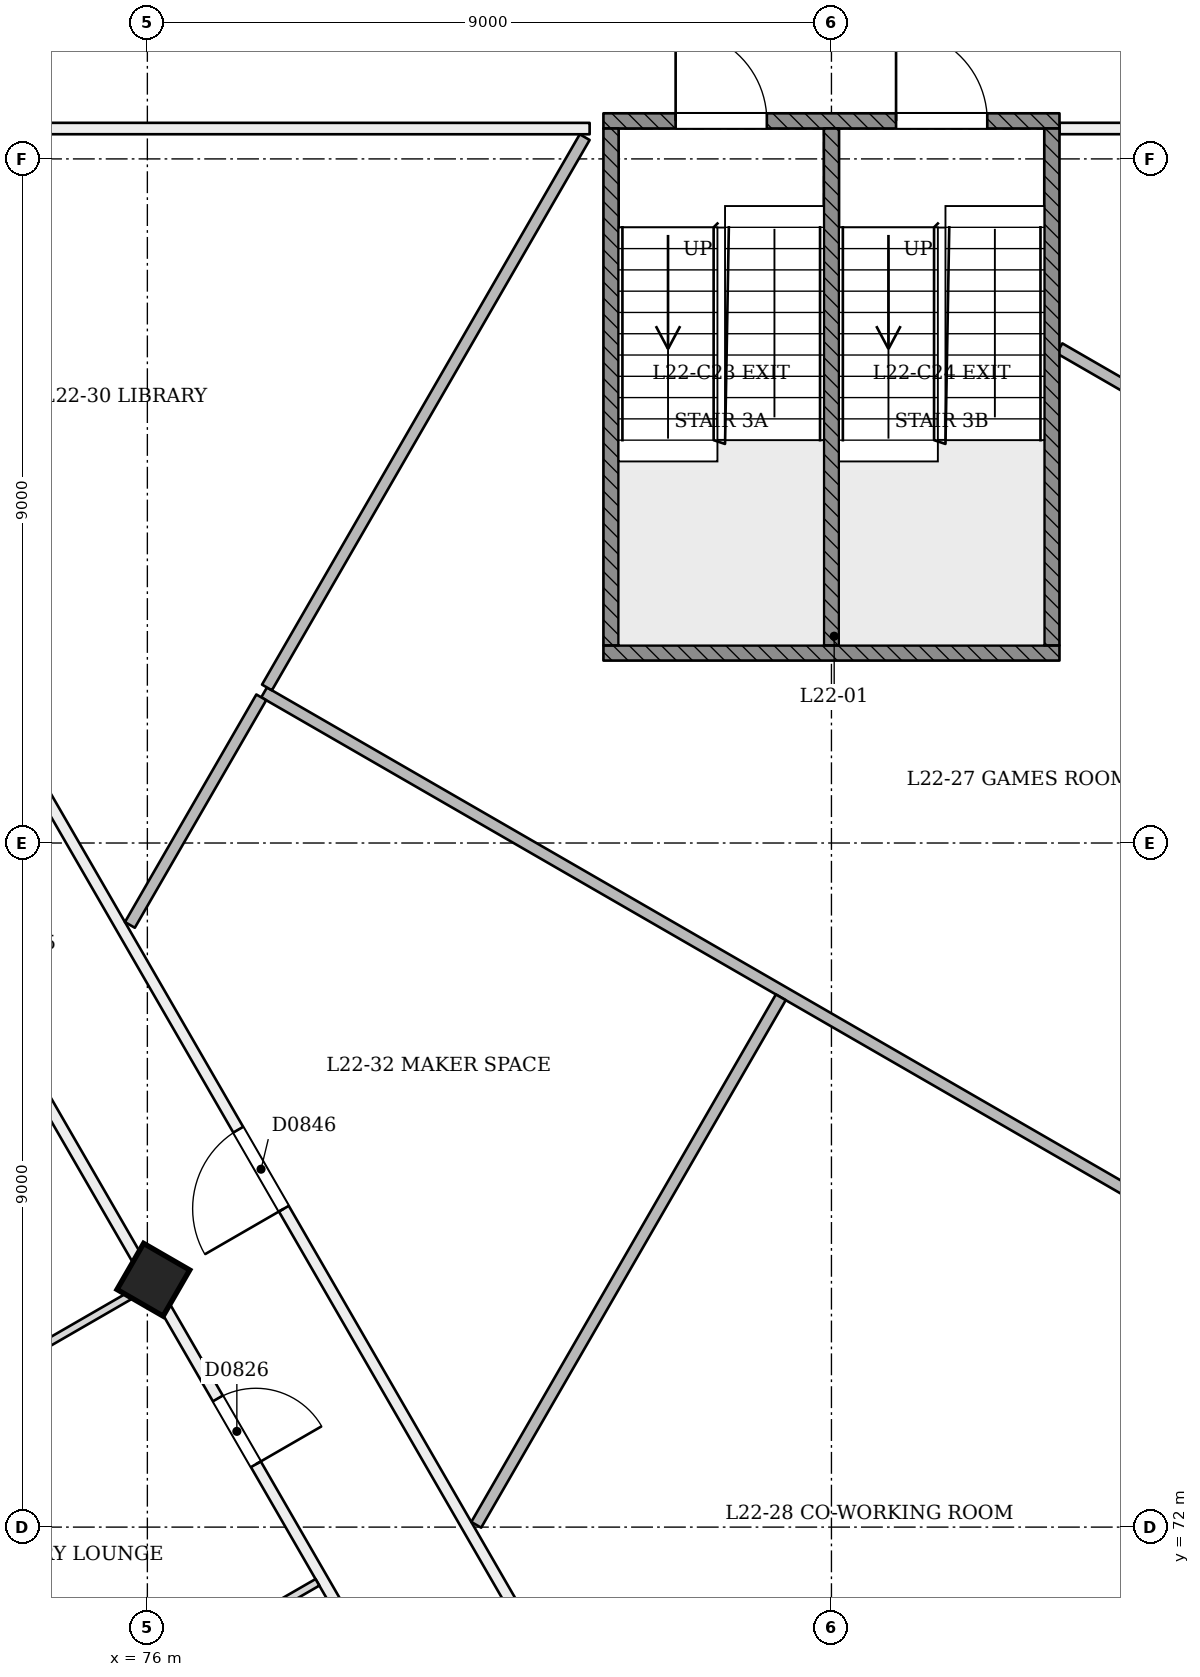
"""IFC4 building model, lengths in metres.
Left out: names, types, materials, properties, quantities, classifications, styles, units other than length and angle.
Written with IfcOpenShell. Run it as: python <this file> out.ifc"""

import sys

from ifc_helpers import new_model, si_unit, direction, frame, frame_2d, origin, origin_2d, place, context, subcontext, project, spatial, rectangle, extrude, element, fill, save


model = new_model("IFC4")
c1 = context("Model", 3, precision=1e-05, world=origin(), true_north=direction((0.0, 1.0)))
c2 = subcontext(c1, "Body", "Model", "MODEL_VIEW")
j1 = project(units=[si_unit("LENGTHUNIT", "METRE"), si_unit("PLANEANGLEUNIT", "RADIAN")], contexts=[c1])
p1 = place(None, origin())
s1 = spatial("IfcSite", under=j1, at=p1, CompositionType="ELEMENT")
p2 = place(p1, origin())
s2 = spatial("IfcBuilding", under=s1, at=p2, CompositionType="ELEMENT")
p3 = place(p2, frame((0.0, 0.0, 88.2)))
s3 = spatial("IfcBuildingStorey", under=s2, at=p3, CompositionType="ELEMENT", Elevation=88.2)
p4 = place(p3, frame((76.052, 75.207, -0.021), z_axis=(0.02222134892, 0.038480872521, 0.999012229206), x_axis=(-0.865642081321, -0.499182199018, 0.038482713395)))
e1 = element("IfcColumn", 1, at=p4, inside=s3, PredefinedType="COLUMN", context=c2, shape_type="SweptSolid", body=[
    extrude(rectangle(XDim=0.7, YDim=0.7, at=origin_2d()), origin(), (0.0, 0.0, 1.0), 3.604),
])
p5 = place(p3, frame((63.198, 97.473, 0.0), z_axis=(0.0, 0.0, 1.0), x_axis=(0.499996804348, -0.866027248787, 0.0)))
e2 = element("IfcWall", 2, at=p5, inside=s3, PredefinedType="PARTITIONING", context=c2, shape_type="SweptSolid", body=[
    extrude(rectangle(XDim=42.418, YDim=0.15, at=frame_2d((21.209, 0.0))), origin(), (0.0, 0.0, 1.0), 2.7),
])
p6 = place(p5, frame((3.123, 0.0, 0.0)))
e3 = element("IfcOpeningElement", 3, at=p6, cuts=e2, PredefinedType="OPENING", context=c2, shape_type="SweptSolid", body=[
    extrude(rectangle(XDim=1.2, YDim=2.1, at=frame_2d((0.6, 1.05))), frame((0.0, 0.085, 0.0), z_axis=(0.0, -1.0, 0.0), x_axis=(1.0, 0.0, 0.0)), (0.0, 0.0, 1.0), 0.171),
])
p7 = place(p5, frame((10.538, 0.0, 0.0)))
e4 = element("IfcOpeningElement", 4, at=p7, cuts=e2, PredefinedType="OPENING", context=c2, shape_type="SweptSolid", body=[
    extrude(rectangle(XDim=1.1, YDim=2.1, at=frame_2d((0.55, 1.05))), frame((0.0, 0.085, 0.0), z_axis=(0.0, -1.0, 0.0), x_axis=(1.0, 0.0, 0.0)), (0.0, 0.0, 1.0), 0.171),
])
p8 = place(p5, frame((12.814, 0.0, 0.0)))
e5 = element("IfcOpeningElement", 5, at=p8, cuts=e2, PredefinedType="OPENING", context=c2, shape_type="SweptSolid", body=[
    extrude(rectangle(XDim=1.0, YDim=2.1, at=frame_2d((0.5, 1.05))), frame((0.0, 0.085, 0.0), z_axis=(0.0, -1.0, 0.0), x_axis=(1.0, 0.0, 0.0)), (0.0, 0.0, 1.0), 0.171),
])
p9 = place(p5, frame((20.609, 0.0, 0.0)))
e6 = element("IfcOpeningElement", 6, at=p9, cuts=e2, PredefinedType="OPENING", context=c2, shape_type="SweptSolid", body=[
    extrude(rectangle(XDim=1.2, YDim=2.1, at=frame_2d((0.6, 1.05))), frame((0.0, 0.085, 0.0), z_axis=(0.0, -1.0, 0.0), x_axis=(1.0, 0.0, 0.0)), (0.0, 0.0, 1.0), 0.171),
])
p10 = place(p5, frame((27.459, 0.0, 0.0)))
e7 = element("IfcOpeningElement", 7, at=p10, cuts=e2, PredefinedType="OPENING", context=c2, shape_type="SweptSolid", body=[
    extrude(rectangle(XDim=1.0, YDim=2.1, at=frame_2d((0.5, 1.05))), frame((0.0, 0.085, 0.0), z_axis=(0.0, -1.0, 0.0), x_axis=(1.0, 0.0, 0.0)), (0.0, 0.0, 1.0), 0.171),
])
p11 = place(p5, frame((31.959, 0.0, 0.0)))
e8 = element("IfcOpeningElement", 8, at=p11, cuts=e2, PredefinedType="OPENING", context=c2, shape_type="SweptSolid", body=[
    extrude(rectangle(XDim=1.0, YDim=2.1, at=frame_2d((0.5, 1.05))), frame((0.0, 0.085, 0.0), z_axis=(0.0, -1.0, 0.0), x_axis=(1.0, 0.0, 0.0)), (0.0, 0.0, 1.0), 0.171),
])
p12 = place(p5, frame((40.905, 0.0, 0.0)))
e9 = element("IfcOpeningElement", 9, at=p12, cuts=e2, PredefinedType="OPENING", context=c2, shape_type="SweptSolid", body=[
    extrude(rectangle(XDim=1.2, YDim=2.1, at=frame_2d((0.6, 1.05))), frame((0.0, 0.085, 0.0), z_axis=(0.0, -1.0, 0.0), x_axis=(1.0, 0.0, 0.0)), (0.0, 0.0, 1.0), 0.171),
])
p13 = place(p3, frame((87.198, 63.517, 0.0), z_axis=(0.0, 0.0, 1.0), x_axis=(0.499999136801, 0.866025902152, 0.0)))
e10 = element("IfcWall", 10, at=p13, inside=s3, PredefinedType="PARTITIONING", context=c2, shape_type="SweptSolid", body=[
    extrude(rectangle(XDim=39.209, YDim=0.15, at=frame_2d((19.604, 0.0))), origin(), (0.0, 0.0, 1.0), 2.7),
])
p14 = place(p13, frame((2.8, 0.0, 0.0)))
e11 = element("IfcOpeningElement", 11, at=p14, cuts=e10, PredefinedType="OPENING", context=c2, shape_type="SweptSolid", body=[
    extrude(rectangle(XDim=1.2, YDim=2.1, at=frame_2d((0.6, 1.05))), frame((0.0, 0.085, 0.0), z_axis=(0.0, -1.0, 0.0), x_axis=(1.0, 0.0, 0.0)), (0.0, 0.0, 1.0), 0.171),
])
p15 = place(p13, frame((9.72, 0.0, 0.0)))
e12 = element("IfcOpeningElement", 12, at=p15, cuts=e10, PredefinedType="OPENING", context=c2, shape_type="SweptSolid", body=[
    extrude(rectangle(XDim=1.0, YDim=2.1, at=frame_2d((0.5, 1.05))), frame((0.0, 0.085, 0.0), z_axis=(0.0, -1.0, 0.0), x_axis=(1.0, 0.0, 0.0)), (0.0, 0.0, 1.0), 0.171),
])
p16 = place(p13, frame((16.395, 0.0, 0.0)))
e13 = element("IfcOpeningElement", 13, at=p16, cuts=e10, PredefinedType="OPENING", context=c2, shape_type="SweptSolid", body=[
    extrude(rectangle(XDim=1.0, YDim=2.1, at=frame_2d((0.5, 1.05))), frame((0.0, 0.085, 0.0), z_axis=(0.0, -1.0, 0.0), x_axis=(1.0, 0.0, 0.0)), (0.0, 0.0, 1.0), 0.171),
])
p17 = place(p13, frame((19.75, 0.0, 0.0)))
e14 = element("IfcOpeningElement", 14, at=p17, cuts=e10, PredefinedType="OPENING", context=c2, shape_type="SweptSolid", body=[
    extrude(rectangle(XDim=1.0, YDim=2.1, at=frame_2d((0.5, 1.05))), frame((0.0, 0.085, 0.0), z_axis=(0.0, -1.0, 0.0), x_axis=(1.0, 0.0, 0.0)), (0.0, 0.0, 1.0), 0.171),
])
p18 = place(p13, frame((25.395, 0.0, 0.0)))
e15 = element("IfcOpeningElement", 15, at=p18, cuts=e10, PredefinedType="OPENING", context=c2, shape_type="SweptSolid", body=[
    extrude(rectangle(XDim=1.0, YDim=2.1, at=frame_2d((0.5, 1.05))), frame((0.0, 0.085, 0.0), z_axis=(0.0, -1.0, 0.0), x_axis=(1.0, 0.0, 0.0)), (0.0, 0.0, 1.0), 0.171),
])
p19 = place(p13, frame((29.8, 0.0, 0.0)))
e16 = element("IfcOpeningElement", 16, at=p19, cuts=e10, PredefinedType="OPENING", context=c2, shape_type="SweptSolid", body=[
    extrude(rectangle(XDim=1.2, YDim=2.1, at=frame_2d((0.6, 1.05))), frame((0.0, 0.085, 0.0), z_axis=(0.0, -1.0, 0.0), x_axis=(1.0, 0.0, 0.0)), (0.0, 0.0, 1.0), 0.171),
])
p20 = place(p13, frame((37.225, 0.0, 0.0)))
e17 = element("IfcOpeningElement", 17, at=p20, cuts=e10, PredefinedType="OPENING", context=c2, shape_type="SweptSolid", body=[
    extrude(rectangle(XDim=1.0, YDim=2.1, at=frame_2d((0.5, 1.05))), frame((0.0, 0.085, 0.0), z_axis=(0.0, -1.0, 0.0), x_axis=(1.0, 0.0, 0.0)), (0.0, 0.0, 1.0), 0.171),
])
p21 = place(p3, frame((100.409, 90.4, 0.0), z_axis=(0.0, 0.0, 1.0), x_axis=(-0.500001354695, -0.86602462165, 0.0)))
e18 = element("IfcWall", 18, at=p21, inside=s3, PredefinedType="PARTITIONING", context=c2, shape_type="SweptSolid", body=[
    extrude(rectangle(XDim=30.688, YDim=0.15, at=frame_2d((15.344, 0.0))), origin(), (0.0, 0.0, 1.0), 3.1),
])
p22 = place(p21, frame((13.301, 0.0, 0.0)))
e19 = element("IfcOpeningElement", 19, at=p22, cuts=e18, PredefinedType="OPENING", context=c2, shape_type="SweptSolid", body=[
    extrude(rectangle(XDim=1.2, YDim=2.1, at=frame_2d((0.6, 1.05))), frame((0.0, 0.085, 0.0), z_axis=(0.0, -1.0, 0.0), x_axis=(1.0, 0.0, 0.0)), (0.0, 0.0, 1.0), 0.171),
])
p23 = place(p21, frame((4.95, 0.0, 0.0)))
e20 = element("IfcOpeningElement", 20, at=p23, cuts=e18, PredefinedType="OPENING", context=c2, shape_type="SweptSolid", body=[
    extrude(rectangle(XDim=1.2, YDim=2.1, at=frame_2d((0.6, 1.05))), frame((0.0, 0.085, 0.0), z_axis=(0.0, -1.0, 0.0), x_axis=(1.0, 0.0, 0.0)), (0.0, 0.0, 1.0), 0.171),
])
p24 = place(p3, frame((85.0, 63.711, 0.0), z_axis=(0.0, 0.0, 1.0), x_axis=(-0.500003837735, 0.866023188056, 0.0)))
e21 = element("IfcWall", 21, at=p24, inside=s3, PredefinedType="PARTITIONING", context=c2, shape_type="SweptSolid", body=[
    extrude(rectangle(XDim=30.818, YDim=0.15, at=frame_2d((15.409, 0.0))), origin(), (0.0, 0.0, 1.0), 3.1),
])
p25 = place(p24, frame((6.476, 0.0, 0.0)))
e22 = element("IfcOpeningElement", 22, at=p25, cuts=e21, PredefinedType="OPENING", context=c2, shape_type="SweptSolid", body=[
    extrude(rectangle(XDim=1.2, YDim=2.1, at=frame_2d((0.6, 1.05))), frame((0.0, 0.085, 0.0), z_axis=(0.0, -1.0, 0.0), x_axis=(1.0, 0.0, 0.0)), (0.0, 0.0, 1.0), 0.171),
])
p26 = place(p24, frame((24.104, 0.0, 0.0)))
e23 = element("IfcOpeningElement", 23, at=p26, cuts=e21, PredefinedType="OPENING", context=c2, shape_type="SweptSolid", body=[
    extrude(rectangle(XDim=1.2, YDim=2.1, at=frame_2d((0.6, 1.05))), frame((0.0, 0.085, 0.0), z_axis=(0.0, -1.0, 0.0), x_axis=(1.0, 0.0, 0.0)), (0.0, 0.0, 1.0), 0.171),
])
p27 = place(p24, frame((14.409, 0.0, 0.0)))
e24 = element("IfcOpeningElement", 24, at=p27, cuts=e21, PredefinedType="OPENING", context=c2, shape_type="SweptSolid", body=[
    extrude(rectangle(XDim=1.2, YDim=2.1, at=frame_2d((0.6, 1.05))), frame((0.0, 0.085, 0.0), z_axis=(0.0, -1.0, 0.0), x_axis=(1.0, 0.0, 0.0)), (0.0, 0.0, 1.0), 0.171),
])
p28 = place(p3, frame((69.721, 90.4, 0.0), z_axis=(0.0, 0.0, 1.0), x_axis=(0.999999996742, -8.0721651e-05, 0.0)))
e25 = element("IfcWall", 25, at=p28, inside=s3, PredefinedType="PARTITIONING", context=c2, shape_type="SweptSolid", body=[
    extrude(rectangle(XDim=12.098, YDim=0.15, at=frame_2d((6.049, 0.0))), origin(), (0.0, 0.0, 1.0), 3.1),
])
p29 = place(p3, frame((88.0, 90.4, 0.0), z_axis=(0.0, 0.0, 1.0), x_axis=(1.0, 0.0, 0.0)))
e26 = element("IfcWall", 26, at=p29, inside=s3, PredefinedType="PARTITIONING", context=c2, shape_type="SweptSolid", body=[
    extrude(rectangle(XDim=12.279, YDim=0.15, at=frame_2d((6.14, 0.0))), origin(), (0.0, 0.0, 1.0), 3.1),
])
p30 = place(p3, frame((70.51, 72.008, 0.0), z_axis=(0.0, 0.0, 1.0), x_axis=(0.866015887322, 0.500016482634, 0.0)))
e27 = element("IfcWall", 27, at=p30, inside=s3, PredefinedType="PARTITIONING", context=c2, shape_type="SweptSolid", body=[
    extrude(rectangle(XDim=6.325, YDim=0.1, at=frame_2d((3.163, 0.0))), origin(), (0.0, 0.0, 1.0), 2.6),
])
p31 = place(p3, frame((72.742, 68.101, 0.0), z_axis=(0.0, 0.0, 1.0), x_axis=(0.866025401434, 0.500000004071, 0.0)))
e28 = element("IfcWall", 28, at=p31, inside=s3, PredefinedType="PARTITIONING", context=c2, shape_type="SweptSolid", body=[
    extrude(rectangle(XDim=6.345, YDim=0.1, at=frame_2d((3.173, 0.0))), origin(), (0.0, 0.0, 1.0), 2.6),
])
p32 = place(p3, frame((77.536, 82.981, 0.0), z_axis=(0.0, 0.0, 1.0), x_axis=(0.866023714899, -0.500002925224, 0.0)))
e29 = element("IfcWall", 29, at=p32, inside=s3, PredefinedType="PARTITIONING", context=c2, shape_type="SweptSolid", body=[
    extrude(rectangle(XDim=16.024, YDim=0.15, at=frame_2d((8.012, 0.0))), origin(), (0.0, 0.0, 1.0), 3.1),
])
p33 = place(p3, frame((81.754, 90.287, 0.0), z_axis=(0.0, 0.0, 1.0), x_axis=(-0.500002199304, -0.866024134012, 0.0)))
e30 = element("IfcWall", 30, at=p33, inside=s3, PredefinedType="PARTITIONING", context=c2, shape_type="SweptSolid", body=[
    extrude(rectangle(XDim=8.36, YDim=0.15, at=frame_2d((4.18, 0.0))), origin(), (0.0, 0.0, 1.0), 3.1),
])
p34 = place(p3, frame((95.99, 82.895, 0.0), z_axis=(0.0, 0.0, 1.0), x_axis=(-0.866018126392, 0.500012604601, 0.0)))
e31 = element("IfcWall", 31, at=p34, inside=s3, PredefinedType="PARTITIONING", context=c2, shape_type="SweptSolid", body=[
    extrude(rectangle(XDim=9.226, YDim=0.15, at=frame_2d((4.613, 0.0))), origin(), (0.0, 0.0, 1.0), 3.1),
])
p35 = place(p3, frame((84.334, 78.97, 0.0), z_axis=(0.0, 0.0, 1.0), x_axis=(-0.500001977421, -0.866024262117, 0.0)))
e32 = element("IfcWall", 32, at=p35, inside=s3, PredefinedType="PARTITIONING", context=c2, shape_type="SweptSolid", body=[
    extrude(rectangle(XDim=8.014, YDim=0.15, at=frame_2d((4.007, 0.0))), origin(), (0.0, 0.0, 1.0), 3.1),
])
p36 = place(p3, frame((75.77, 79.922, 0.0), z_axis=(0.0, 0.0, 1.0), x_axis=(0.49996696679, 0.866044474677, 0.0)))
e33 = element("IfcWall", 33, at=p36, inside=s3, PredefinedType="PARTITIONING", context=c2, shape_type="SweptSolid", body=[
    extrude(rectangle(XDim=3.457, YDim=0.15, at=frame_2d((1.729, 0.0))), origin(), (0.0, 0.0, 1.0), 3.1),
])
p37 = place(p3, frame((82.0, 90.5, 0.0), z_axis=(0.0, 0.0, 1.0), x_axis=(1.0, 0.0, 0.0)))
e34 = element("IfcWall", 34, at=p37, inside=s3, PredefinedType="SOLIDWALL", context=c2, shape_type="SweptSolid", body=[
    extrude(rectangle(XDim=6.0, YDim=0.2, at=frame_2d((3.0, 0.0))), origin(), (0.0, 0.0, 1.0), 3.1),
])
p38 = place(p37, frame((0.95, 0.0, 0.0)))
e35 = element("IfcOpeningElement", 35, at=p38, cuts=e34, PredefinedType="OPENING", context=c2, shape_type="SweptSolid", body=[
    extrude(rectangle(XDim=1.2, YDim=2.1, at=frame_2d((0.6, 1.05))), frame((0.0, 0.11, 0.0), z_axis=(0.0, -1.0, 0.0), x_axis=(1.0, 0.0, 0.0)), (0.0, 0.0, 1.0), 0.221),
])
p39 = place(p37, frame((3.85, 0.0, 0.0)))
e36 = element("IfcOpeningElement", 36, at=p39, cuts=e34, PredefinedType="OPENING", context=c2, shape_type="SweptSolid", body=[
    extrude(rectangle(XDim=1.2, YDim=2.1, at=frame_2d((0.6, 1.05))), frame((0.0, 0.11, 0.0), z_axis=(0.0, -1.0, 0.0), x_axis=(1.0, 0.0, 0.0)), (0.0, 0.0, 1.0), 0.221),
])
p40 = place(p3, frame((82.0, 83.5, 0.0), z_axis=(0.0, 0.0, 1.0), x_axis=(1.0, 0.0, 0.0)))
e37 = element("IfcWall", 37, at=p40, inside=s3, PredefinedType="SOLIDWALL", context=c2, shape_type="SweptSolid", body=[
    extrude(rectangle(XDim=6.0, YDim=0.2, at=frame_2d((3.0, 0.0))), origin(), (0.0, 0.0, 1.0), 3.1),
])
for number, where, z_axis, x_axis in (
    (38, (82.1, 83.6, 0.0), (0.0, 0.0, 1.0), (0.0, 1.0, 0.0)),
    (39, (87.9, 83.6, 0.0), (0.0, 0.0, 1.0), (0.0, 1.0, 0.0)),
    (40, (85.0, 83.6, 0.0), (0.0, 0.0, 1.0), (0.0, 1.0, 0.0)),
):
    element("IfcWall", number, at=place(p3, frame(where, z_axis=z_axis, x_axis=x_axis)), inside=s3, PredefinedType="SOLIDWALL", context=c2, shape_type="SweptSolid", body=[
        extrude(rectangle(XDim=6.8, YDim=0.2, at=frame_2d((3.4, 0.0))), origin(), (0.0, 0.0, 1.0), 3.1),
    ])
p41 = place(p10, origin())
e41 = element("IfcDoor", 41, at=p41, inside=s3, OperationType="SINGLE_SWING_RIGHT", PredefinedType="NOTDEFINED", context=c2, shape_type="SweptSolid", body=[
    extrude(rectangle(XDim=1.0, YDim=2.1, at=frame_2d((0.5, 1.05))), frame((0.0, 0.025, 0.0), z_axis=(0.0, -1.0, 0.0), x_axis=(1.0, 0.0, 0.0)), (0.0, 0.0, 1.0), 0.05),
])
fill(e7, e41)
p42 = place(p27, origin())
e42 = element("IfcDoor", 42, at=p42, inside=s3, OperationType="SINGLE_SWING_LEFT", PredefinedType="NOTDEFINED", context=c2, shape_type="SweptSolid", body=[
    extrude(rectangle(XDim=1.2, YDim=2.1, at=frame_2d((0.6, 1.05))), frame((0.0, 0.025, 0.0), z_axis=(0.0, -1.0, 0.0), x_axis=(1.0, 0.0, 0.0)), (0.0, 0.0, 1.0), 0.05),
])
fill(e24, e42)
p43 = place(p38, origin())
e43 = element("IfcDoor", 43, at=p43, inside=s3, OperationType="SINGLE_SWING_LEFT", PredefinedType="NOTDEFINED", context=c2, shape_type="SweptSolid", body=[
    extrude(rectangle(XDim=1.2, YDim=2.1, at=frame_2d((0.6, 1.05))), frame((0.0, 0.025, 0.0), z_axis=(0.0, -1.0, 0.0), x_axis=(1.0, 0.0, 0.0)), (0.0, 0.0, 1.0), 0.05),
])
fill(e35, e43)
p44 = place(p39, origin())
e44 = element("IfcDoor", 44, at=p44, inside=s3, OperationType="SINGLE_SWING_LEFT", PredefinedType="NOTDEFINED", context=c2, shape_type="SweptSolid", body=[
    extrude(rectangle(XDim=1.2, YDim=2.1, at=frame_2d((0.6, 1.05))), frame((0.0, 0.025, 0.0), z_axis=(0.0, -1.0, 0.0), x_axis=(1.0, 0.0, 0.0)), (0.0, 0.0, 1.0), 0.05),
])
fill(e36, e44)
save(model, sys.argv[1])
